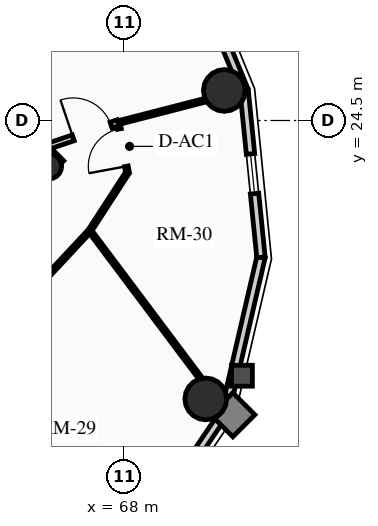
"""IFC4 building model, lengths in metres.
Left out: names, types, materials, properties, quantities, classifications, styles, units other than length and angle.
Written with IfcOpenShell. Run it as: python <this file> out.ifc"""

import sys

from ifc_helpers import new_model, si_unit, direction, frame, frame_2d, origin, origin_2d, place, context, subcontext, project, spatial, rectangle, circle, hollow_circle, extrude, source, transform, mapped, element, fill, save


model = new_model("IFC4")
c1 = context("Model", 3, precision=1e-05, world=origin(), true_north=direction((0.0, 1.0)))
c2 = subcontext(c1, "Body", "Model", "MODEL_VIEW")
j1 = project(units=[si_unit("LENGTHUNIT", "METRE"), si_unit("PLANEANGLEUNIT", "RADIAN")], contexts=[c1])
p1 = place(None, origin())
s1 = spatial("IfcSite", under=j1, at=p1, CompositionType="ELEMENT")
p2 = place(p1, origin())
s2 = spatial("IfcBuilding", under=s1, at=p2, CompositionType="ELEMENT")
p3 = place(p2, frame((0.0, 0.0, 202.48)))
s3 = spatial("IfcBuildingStorey", under=s2, at=p3, CompositionType="ELEMENT", Elevation=202.48)
p4 = place(p3, frame((66.268, 23.298, 0.0), z_axis=(0.0, 0.0, 1.0), x_axis=(-0.707106781187, 0.707106781187, 0.0)))
e1 = element("IfcWall", 1, at=p4, inside=s3, PredefinedType="SHEAR", context=c2, shape_type="SweptSolid", body=[
    extrude(rectangle(XDim=14.1, YDim=0.4, at=frame_2d((7.05, 0.0))), origin(), (0.0, 0.0, 1.0), 2.91),
])
p5 = place(p3, frame((58.561, 15.873, 0.0), z_axis=(0.0, 0.0, 1.0), x_axis=(0.707106781187, 0.707106781187, 0.0)))
e2 = element("IfcWall", 2, at=p5, inside=s3, PredefinedType="SHEAR", context=c2, shape_type="SweptSolid", body=[
    extrude(rectangle(XDim=10.7, YDim=0.4, at=frame_2d((5.35, 0.0))), origin(), (0.0, 0.0, 1.0), 2.91),
])
m1 = source(origin(), c2, "Body", "SweptSolid", [
    extrude(rectangle(XDim=1.5, YDim=2.02, at=frame_2d((0.75, 1.01))), frame((0.0, 0.21, 0.0), z_axis=(0.0, -1.0, 0.0), x_axis=(1.0, 0.0, 0.0)), (0.0, 0.0, 1.0), 0.42),
])
p6 = place(p5, frame((5.45, 0.0, 0.0)))
e3 = element("IfcOpeningElement", 3, at=p6, cuts=e2, PredefinedType="OPENING", context=c2, shape_type="MappedRepresentation", body=[
    mapped(m1, transform((0.0, 0.0, 0.0), x_axis=(1.0, 0.0, 0.0), y_axis=(0.0, 1.0, 0.0), z_axis=(0.0, 0.0, 1.0), scale=1.0)),
])
p7 = place(p3, frame((66.024, 23.294, 0.0), z_axis=(0.0, 0.0, 1.0), x_axis=(0.707106781187, 0.707106781187, 0.0)))
e4 = element("IfcColumn", 4, at=p7, inside=s3, PredefinedType="COLUMN", context=c2, shape_type="SweptSolid", body=[
    extrude(hollow_circle(Radius=0.33, WallThickness=0.025, at=origin_2d()), origin(), (0.0, 0.0, 1.0), 2.91),
])
for number, where, z_axis, x_axis in (
    (5, (70.146, 17.173, 0.0), (0.0, 0.0, 1.0), (1.0, 0.0, 0.0)),
    (6, (70.635, 25.291, 0.0), (0.0, 0.0, 1.0), (1.0, 0.0, 0.0)),
):
    element("IfcColumn", number, at=place(p3, frame(where, z_axis=z_axis, x_axis=x_axis)), inside=s3, PredefinedType="USERDEFINED", context=c2, shape_type="SweptSolid", body=[
        extrude(circle(Radius=0.55, at=origin_2d()), origin(), (0.0, 0.0, 1.0), 2.91),
    ])
p8 = place(p3, frame((70.663, 16.856, 0.0), z_axis=(0.0, 0.0, 1.0), x_axis=(-0.559495003079, -0.828833723692, 0.0)))
e7 = element("IfcWall", 7, at=p8, inside=s3, PredefinedType="SOLIDWALL", context=c2, shape_type="SweptSolid", body=[
    extrude(rectangle(XDim=3.976, YDim=0.22, at=frame_2d((1.988, 0.0))), origin(), (0.0, 0.0, 1.0), 2.322),
])
m2 = source(origin(), c2, "Body", "SweptSolid", [
    extrude(rectangle(XDim=1.05, YDim=1.3, at=frame_2d((0.525, 0.65))), frame((0.0, 0.12, 0.0), z_axis=(0.0, -1.0, 0.0), x_axis=(1.0, 0.0, 0.0)), (0.0, 0.0, 1.0), 0.24),
])
p9 = place(p8, frame((1.463, 0.0, 0.65)))
e8 = element("IfcOpeningElement", 8, at=p9, cuts=e7, PredefinedType="OPENING", context=c2, shape_type="MappedRepresentation", body=[
    mapped(m2, transform((0.0, 0.0, 0.0), x_axis=(1.0, 0.0, 0.0), y_axis=(0.0, 1.0, 0.0), z_axis=(0.0, 0.0, 1.0), scale=1.0)),
])
p10 = place(p3, frame((71.599, 20.9, 0.0), z_axis=(0.0, 0.0, 1.0), x_axis=(-0.225473813158, -0.974249228678, 0.0)))
e9 = element("IfcWall", 9, at=p10, inside=s3, PredefinedType="SOLIDWALL", context=c2, shape_type="SweptSolid", body=[
    extrude(rectangle(XDim=4.15, YDim=0.22, at=frame_2d((2.075, 0.0))), origin(), (0.0, 0.0, 1.0), 2.322),
])
p11 = place(p3, frame((71.155, 25.295, 0.0), z_axis=(0.0, 0.0, 1.0), x_axis=(0.100570534541, -0.994929930991, 0.0)))
e10 = element("IfcWall", 10, at=p11, inside=s3, PredefinedType="SOLIDWALL", context=c2, shape_type="SweptSolid", body=[
    extrude(rectangle(XDim=4.418, YDim=0.22, at=frame_2d((2.209, 0.0))), origin(), (0.0, 0.0, 1.0), 2.322),
])
p12 = place(p11, frame((1.684, 0.0, 0.65)))
e11 = element("IfcOpeningElement", 11, at=p12, cuts=e10, PredefinedType="OPENING", context=c2, shape_type="MappedRepresentation", body=[
    mapped(m2, transform((0.0, 0.0, 0.0), x_axis=(1.0, 0.0, 0.0), y_axis=(0.0, 1.0, 0.0), z_axis=(0.0, 0.0, 1.0), scale=1.0)),
])
p13 = place(p3, frame((69.374, 29.613, 0.0), z_axis=(0.0, 0.0, 1.0), x_axis=(0.381309704956, -0.924447353237, 0.0)))
e12 = element("IfcWall", 12, at=p13, inside=s3, PredefinedType="SOLIDWALL", context=c2, shape_type="SweptSolid", body=[
    extrude(rectangle(XDim=4.671, YDim=0.22, at=frame_2d((2.335, 0.0))), origin(), (0.0, 0.0, 1.0), 2.322),
])
p14 = place(p3, frame((62.736, 16.924, 0.0), z_axis=(0.0, 0.0, 1.0), x_axis=(0.681946700833, 0.731401871219, 0.0)))
e13 = element("IfcWall", 13, at=p14, inside=s3, PredefinedType="MOVABLE", context=c2, shape_type="SweptSolid", body=[
    extrude(rectangle(XDim=6.393, YDim=0.1, at=frame_2d((3.196, 0.0))), origin(), (0.0, 0.0, 1.0), 2.255),
])
p15 = place(p3, frame((67.095, 21.6, 0.0), z_axis=(0.0, 0.0, 1.0), x_axis=(0.543773190184, 0.839232219137, 0.0)))
e14 = element("IfcWall", 14, at=p15, inside=s3, PredefinedType="MOVABLE", context=c2, shape_type="SweptSolid", body=[
    extrude(rectangle(XDim=1.823, YDim=0.1, at=frame_2d((0.911, 0.0))), origin(), (0.0, 0.0, 1.0), 2.255),
])
p16 = place(p3, frame((68.086, 23.129, 0.0), z_axis=(0.0, 0.0, 1.0), x_axis=(-0.182004193146, 0.983297754334, 0.0)))
e15 = element("IfcWall", 15, at=p16, inside=s3, PredefinedType="MOVABLE", context=c2, shape_type="SweptSolid", body=[
    extrude(rectangle(XDim=1.336, YDim=0.1, at=frame_2d((0.668, 0.0))), origin(), (0.0, 0.0, 1.0), 2.322),
])
m3 = source(origin(), c2, "Body", "SweptSolid", [
    extrude(rectangle(XDim=1.0, YDim=2.015, at=frame_2d((0.5, 1.007))), frame((0.0, 0.06, 0.0), z_axis=(0.0, -1.0, 0.0), x_axis=(1.0, 0.0, 0.0)), (0.0, 0.0, 1.0), 0.12),
])
p17 = place(p16, frame((0.168, 0.0, 0.0)))
e16 = element("IfcOpeningElement", 16, at=p17, cuts=e15, PredefinedType="OPENING", context=c2, shape_type="MappedRepresentation", body=[
    mapped(m3, transform((0.0, 0.0, 0.0), x_axis=(1.0, 0.0, 0.0), y_axis=(0.0, 1.0, 0.0), z_axis=(0.0, 0.0, 1.0), scale=1.0)),
])
p18 = place(p3, frame((67.095, 21.6, 0.0), z_axis=(0.0, 0.0, 1.0), x_axis=(0.599947190798, -0.800039604178, 0.0)))
e17 = element("IfcWall", 17, at=p18, inside=s3, PredefinedType="MOVABLE", context=c2, shape_type="SweptSolid", body=[
    extrude(rectangle(XDim=5.918, YDim=0.1, at=frame_2d((2.959, 0.0))), origin(), (0.0, 0.0, 1.0), 2.322),
])
p19 = place(p3, frame((67.843, 24.443, 0.0), z_axis=(0.0, 0.0, 1.0), x_axis=(0.968303102463, 0.249778105048, 0.0)))
e18 = element("IfcWall", 18, at=p19, inside=s3, PredefinedType="MOVABLE", context=c2, shape_type="SweptSolid", body=[
    extrude(rectangle(XDim=3.399, YDim=0.1, at=frame_2d((1.7, 0.0))), origin(), (0.0, 0.0, 1.0), 2.322),
])
p20 = place(p3, frame((66.021, 23.828, 0.0), z_axis=(0.0, 0.0, 1.0), x_axis=(0.947522075691, 0.319690344049, 0.0)))
e19 = element("IfcWall", 19, at=p20, inside=s3, PredefinedType="PARTITIONING", context=c2, shape_type="SweptSolid", body=[
    extrude(rectangle(XDim=1.924, YDim=0.16, at=frame_2d((0.962, 0.0))), origin(), (0.0, 0.0, 1.0), 2.255),
])
m4 = source(origin(), c2, "Body", "SweptSolid", [
    extrude(rectangle(XDim=1.05, YDim=2.015, at=frame_2d((0.525, 1.007))), frame((0.0, 0.09, 0.0), z_axis=(0.0, -1.0, 0.0), x_axis=(1.0, 0.0, 0.0)), (0.0, 0.0, 1.0), 0.18),
])
p21 = place(p20, frame((0.674, 0.0, 0.0)))
e20 = element("IfcOpeningElement", 20, at=p21, cuts=e19, PredefinedType="OPENING", context=c2, shape_type="MappedRepresentation", body=[
    mapped(m4, transform((0.0, 0.0, 0.0), x_axis=(1.0, 0.0, 0.0), y_axis=(0.0, 1.0, 0.0), z_axis=(0.0, 0.0, 1.0), scale=1.0)),
])
m5 = source(origin(), c2, "Body", "SweptSolid", [
    extrude(rectangle(XDim=1.05, YDim=1.3, at=frame_2d((0.525, 0.65))), frame((0.0, 0.03, 0.0), z_axis=(0.0, -1.0, 0.0), x_axis=(1.0, 0.0, 0.0)), (0.0, 0.0, 1.0), 0.06),
])
p22 = place(p12, origin())
e21 = element("IfcWindow", 21, at=p22, inside=s3, PartitioningType="SINGLE_PANEL", PredefinedType="WINDOW", context=c2, shape_type="MappedRepresentation", body=[
    mapped(m5, transform((0.0, 0.0, 0.0), x_axis=(1.0, 0.0, 0.0), y_axis=(0.0, 1.0, 0.0), z_axis=(0.0, 0.0, 1.0), scale=1.0)),
])
fill(e11, e21)
m6 = source(origin(), c2, "Body", "SweptSolid", [
    extrude(rectangle(XDim=1.05, YDim=2.015, at=frame_2d((0.525, 1.007))), frame((0.0, 0.025, 0.0), z_axis=(0.0, -1.0, 0.0), x_axis=(1.0, 0.0, 0.0)), (0.0, 0.0, 1.0), 0.05),
])
p23 = place(p21, origin())
e22 = element("IfcDoor", 22, at=p23, inside=s3, OperationType="SINGLE_SWING_LEFT", PredefinedType="DOOR", context=c2, shape_type="MappedRepresentation", body=[
    mapped(m6, transform((0.0, 0.0, 0.0), x_axis=(1.0, 0.0, 0.0), y_axis=(0.0, 1.0, 0.0), z_axis=(0.0, 0.0, 1.0), scale=1.0)),
])
fill(e20, e22)
m7 = source(origin(), c2, "Body", "SweptSolid", [
    extrude(rectangle(XDim=1.0, YDim=2.015, at=frame_2d((0.5, 1.007))), frame((0.0, 0.025, 0.0), z_axis=(0.0, -1.0, 0.0), x_axis=(1.0, 0.0, 0.0)), (0.0, 0.0, 1.0), 0.05),
])
p24 = place(p17, origin())
e23 = element("IfcDoor", 23, at=p24, inside=s3, OperationType="SINGLE_SWING_LEFT", PredefinedType="DOOR", context=c2, shape_type="MappedRepresentation", body=[
    mapped(m7, transform((0.0, 0.0, 0.0), x_axis=(1.0, 0.0, 0.0), y_axis=(0.0, 1.0, 0.0), z_axis=(0.0, 0.0, 1.0), scale=1.0)),
])
fill(e16, e23)
save(model, sys.argv[1])
